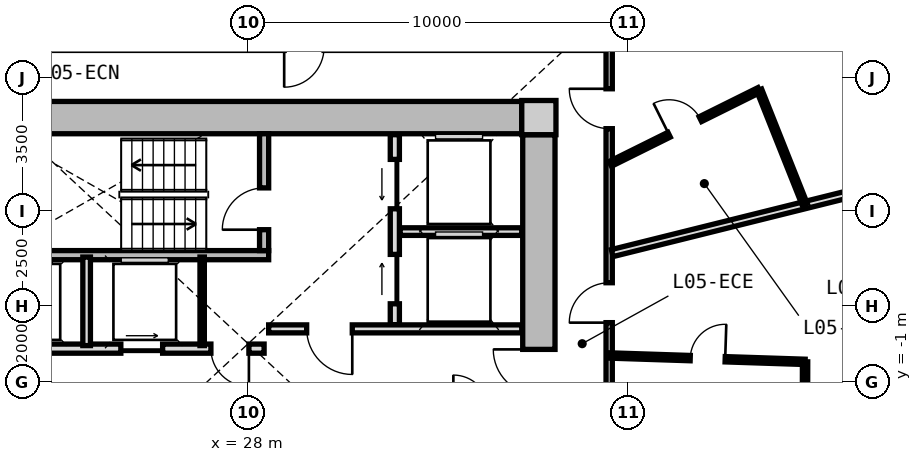
"""IFC4 building model, lengths in metres.
Left out: names, types, materials, properties, quantities, classifications, styles, units other than length and angle.
Written with IfcOpenShell. Run it as: python <this file> out.ifc"""

import sys

from ifc_helpers import new_model, si_unit, direction, frame, frame_2d, origin, origin_2d, place, context, subcontext, project, spatial, rectangle, extrude, source, transform, mapped, element, fill, save


model = new_model("IFC4")
c1 = context("Model", 3, precision=1e-05, world=origin(), true_north=direction((0.0, 1.0)))
c2 = subcontext(c1, "Body", "Model", "MODEL_VIEW")
j1 = project(units=[si_unit("LENGTHUNIT", "METRE"), si_unit("PLANEANGLEUNIT", "RADIAN")], contexts=[c1])
p1 = place(None, origin())
s1 = spatial("IfcSite", under=j1, at=p1, CompositionType="ELEMENT")
p2 = place(p1, origin())
s2 = spatial("IfcBuilding", under=s1, at=p2, CompositionType="ELEMENT")
p3 = place(p2, frame((0.0, 0.0, 21.6)))
s3 = spatial("IfcBuildingStorey", under=s2, at=p3, CompositionType="ELEMENT", Elevation=21.6)
m1 = source(origin(), c2, "Body", "SweptSolid", [
    extrude(rectangle(XDim=0.9, YDim=0.9, at=origin_2d()), origin(), (0.0, 0.0, 1.0), 3.05),
])
p4 = place(p3, frame((35.65, 5.95, 0.0), z_axis=(0.0, 0.0, 1.0), x_axis=(1.0, 0.0, 0.0)))
e1 = element("IfcColumn", 1, at=p4, inside=s3, PredefinedType="COLUMN", context=c2, shape_type="MappedRepresentation", body=[
    mapped(m1, transform((0.0, 0.0, 0.0), x_axis=(1.0, 0.0, 0.0), y_axis=(0.0, 1.0, 0.0), z_axis=(0.0, 0.0, 1.0), scale=1.0)),
])
m2 = source(origin(), c2, "Body", "SweptSolid", [
    extrude(rectangle(XDim=14.4, YDim=0.85, at=frame_2d((7.2, 0.0))), origin(), (0.0, 0.0, 1.0), 2.79),
])
p5 = place(p3, frame((20.8, 5.95, 0.0), z_axis=(0.0, 0.0, 1.0), x_axis=(1.0, 0.0, 0.0)))
e2 = element("IfcWall", 2, at=p5, inside=s3, PredefinedType="SHEAR", context=c2, shape_type="MappedRepresentation", body=[
    mapped(m2, transform((0.0, 0.0, 0.0), x_axis=(1.0, 0.0, 0.0), y_axis=(0.0, 1.0, 0.0), z_axis=(0.0, 0.0, 1.0), scale=1.0)),
])
m3 = source(origin(), c2, "Body", "SweptSolid", [
    extrude(rectangle(XDim=11.0, YDim=0.85, at=frame_2d((5.5, 0.0))), origin(), (0.0, 0.0, 1.0), 2.79),
])
p6 = place(p3, frame((35.65, 5.5, 0.0), z_axis=(0.0, 0.0, 1.0), x_axis=(0.0, -1.0, 0.0)))
e3 = element("IfcWall", 3, at=p6, inside=s3, PredefinedType="SHEAR", context=c2, shape_type="MappedRepresentation", body=[
    mapped(m3, transform((0.0, 0.0, 0.0), x_axis=(1.0, 0.0, 0.0), y_axis=(0.0, 1.0, 0.0), z_axis=(0.0, 0.0, 1.0), scale=1.0)),
])
p7 = place(p6, frame((5.65, 0.0, 0.0)))
e4 = element("IfcOpeningElement", 4, at=p7, cuts=e3, PredefinedType="OPENING", context=c2, shape_type="SweptSolid", body=[
    extrude(rectangle(XDim=1.2, YDim=2.15, at=frame_2d((0.6, 1.075))), frame((0.0, 0.435, 0.0), z_axis=(0.0, -1.0, 0.0), x_axis=(1.0, 0.0, 0.0)), (0.0, 0.0, 1.0), 0.87),
])
p8 = place(p6, frame((9.3, 0.0, 0.0)))
e5 = element("IfcOpeningElement", 5, at=p8, cuts=e3, PredefinedType="OPENING", context=c2, shape_type="SweptSolid", body=[
    extrude(rectangle(XDim=1.0, YDim=2.1, at=frame_2d((0.5, 1.05))), frame((0.0, 0.435, 0.0), z_axis=(0.0, -1.0, 0.0), x_axis=(1.0, 0.0, 0.0)), (0.0, 0.0, 1.0), 0.87),
])
m4 = source(origin(), c2, "Body", "SweptSolid", [
    extrude(rectangle(XDim=9.649, YDim=0.29, at=frame_2d((4.824, 0.0))), origin(), (0.0, 0.0, 1.0), 2.79),
])
p9 = place(p3, frame((41.916, 12.926, 0.0), z_axis=(0.0, 0.0, 1.0), x_axis=(0.527909458386, -0.849300655684, 0.0)))
e6 = element("IfcWall", 6, at=p9, inside=s3, PredefinedType="SOLIDWALL", context=c2, shape_type="MappedRepresentation", body=[
    mapped(m4, transform((0.0, 0.0, 0.0), x_axis=(1.0, 0.0, 0.0), y_axis=(0.0, 1.0, 0.0), z_axis=(0.0, 0.0, 1.0), scale=1.0)),
])
p10 = place(p9, frame((0.98, 0.0, 0.0)))
e7 = element("IfcOpeningElement", 7, at=p10, cuts=e6, PredefinedType="OPENING", context=c2, shape_type="SweptSolid", body=[
    extrude(rectangle(XDim=1.15, YDim=2.25, at=frame_2d((0.575, 1.125))), frame((0.0, 0.155, 0.0), z_axis=(0.0, -1.0, 0.0), x_axis=(1.0, 0.0, 0.0)), (0.0, 0.0, 1.0), 0.31),
])
p11 = place(p9, frame((5.174, 0.0, 0.85)))
e8 = element("IfcOpeningElement", 8, at=p11, cuts=e6, PredefinedType="OPENING", context=c2, shape_type="SweptSolid", body=[
    extrude(rectangle(XDim=1.2, YDim=1.5, at=frame_2d((0.6, 0.75))), frame((0.0, 0.155, 0.0), z_axis=(0.0, -1.0, 0.0), x_axis=(1.0, 0.0, 0.0)), (0.0, 0.0, 1.0), 0.31),
])
m5 = source(origin(), c2, "Body", "SweptSolid", [
    extrude(rectangle(XDim=7.765, YDim=0.24, at=frame_2d((3.883, 0.0))), origin(), (0.0, 0.0, 1.0), 2.79),
])
p12 = place(p3, frame((20.775, 2.33, 0.0), z_axis=(0.0, 0.0, 1.0), x_axis=(1.0, 0.0, 0.0)))
e9 = element("IfcWall", 9, at=p12, inside=s3, PredefinedType="PARTITIONING", context=c2, shape_type="MappedRepresentation", body=[
    mapped(m5, transform((0.0, 0.0, 0.0), x_axis=(1.0, 0.0, 0.0), y_axis=(0.0, 1.0, 0.0), z_axis=(0.0, 0.0, 1.0), scale=1.0)),
])
m6 = source(origin(), c2, "Body", "SweptSolid", [
    extrude(rectangle(XDim=3.075, YDim=0.24, at=frame_2d((1.538, 0.0))), origin(), (0.0, 0.0, 1.0), 2.79),
])
p13 = place(p3, frame((28.42, 2.45, 0.0), z_axis=(0.0, 0.0, 1.0), x_axis=(0.0, 1.0, 0.0)))
e10 = element("IfcWall", 10, at=p13, inside=s3, PredefinedType="PARTITIONING", context=c2, shape_type="MappedRepresentation", body=[
    mapped(m6, transform((0.0, 0.0, 0.0), x_axis=(1.0, 0.0, 0.0), y_axis=(0.0, 1.0, 0.0), z_axis=(0.0, 0.0, 1.0), scale=1.0)),
])
p14 = place(p13, frame((0.55, 0.0, 0.0)))
e11 = element("IfcOpeningElement", 11, at=p14, cuts=e10, PredefinedType="OPENING", context=c2, shape_type="SweptSolid", body=[
    extrude(rectangle(XDim=1.1, YDim=2.15, at=frame_2d((0.55, 1.075))), frame((0.0, 0.13, 0.0), z_axis=(0.0, -1.0, 0.0), x_axis=(1.0, 0.0, 0.0)), (0.0, 0.0, 1.0), 0.26),
])
m7 = source(origin(), c2, "Body", "SweptSolid", [
    extrude(rectangle(XDim=5.0, YDim=0.24, at=frame_2d((2.5, 0.0))), origin(), (0.0, 0.0, 1.0), 2.775),
])
p15 = place(p3, frame((31.86, 0.5, 0.0), z_axis=(0.0, 0.0, 1.0), x_axis=(0.0, 1.0, 0.0)))
e12 = element("IfcWall", 12, at=p15, inside=s3, PredefinedType="PARTITIONING", context=c2, shape_type="MappedRepresentation", body=[
    mapped(m7, transform((0.0, 0.0, 0.0), x_axis=(1.0, 0.0, 0.0), y_axis=(0.0, 1.0, 0.0), z_axis=(0.0, 0.0, 1.0), scale=1.0)),
])
p16 = place(p15, frame((3.05, 0.0, 0.0)))
e13 = element("IfcOpeningElement", 13, at=p16, cuts=e12, PredefinedType="OPENING", context=c2, shape_type="SweptSolid", body=[
    extrude(rectangle(XDim=1.3, YDim=2.2, at=frame_2d((0.65, 1.1))), frame((0.0, 0.13, 0.0), z_axis=(0.0, -1.0, 0.0), x_axis=(1.0, 0.0, 0.0)), (0.0, 0.0, 1.0), 0.26),
])
p17 = place(p15, frame((0.55, 0.0, 0.0)))
e14 = element("IfcOpeningElement", 14, at=p17, cuts=e12, PredefinedType="OPENING", context=c2, shape_type="SweptSolid", body=[
    extrude(rectangle(XDim=1.3, YDim=2.2, at=frame_2d((0.65, 1.1))), frame((0.0, 0.13, 0.0), z_axis=(0.0, -1.0, 0.0), x_axis=(1.0, 0.0, 0.0)), (0.0, 0.0, 1.0), 0.26),
])
m8 = source(origin(), c2, "Body", "SweptSolid", [
    extrude(rectangle(XDim=3.2, YDim=0.2, at=frame_2d((1.6, 0.0))), origin(), (0.0, 0.0, 1.0), 2.775),
])
p18 = place(p3, frame((32.0, 2.95, 0.0), z_axis=(0.0, 0.0, 1.0), x_axis=(1.0, 0.0, 0.0)))
e15 = element("IfcWall", 15, at=p18, inside=s3, PredefinedType="PARTITIONING", context=c2, shape_type="MappedRepresentation", body=[
    mapped(m8, transform((0.0, 0.0, 0.0), x_axis=(1.0, 0.0, 0.0), y_axis=(0.0, 1.0, 0.0), z_axis=(0.0, 0.0, 1.0), scale=1.0)),
])
m9 = source(origin(), c2, "Body", "SweptSolid", [
    extrude(rectangle(XDim=6.66, YDim=0.21, at=frame_2d((3.33, 0.0))), origin(), (0.0, 0.0, 1.0), 2.775),
])
p19 = place(p3, frame((28.54, 0.39, 0.0), z_axis=(0.0, 0.0, 1.0), x_axis=(1.0, 0.0, 0.0)))
e16 = element("IfcWall", 16, at=p19, inside=s3, PredefinedType="PARTITIONING", context=c2, shape_type="MappedRepresentation", body=[
    mapped(m9, transform((0.0, 0.0, 0.0), x_axis=(1.0, 0.0, 0.0), y_axis=(0.0, 1.0, 0.0), z_axis=(0.0, 0.0, 1.0), scale=1.0)),
])
p20 = place(p19, frame((1.0, 0.0, 0.0)))
e17 = element("IfcOpeningElement", 17, at=p20, cuts=e16, PredefinedType="OPENING", context=c2, shape_type="SweptSolid", body=[
    extrude(rectangle(XDim=1.2, YDim=2.15, at=frame_2d((0.6, 1.075))), frame((0.0, 0.115, 0.0), z_axis=(0.0, -1.0, 0.0), x_axis=(1.0, 0.0, 0.0)), (0.0, 0.0, 1.0), 0.23),
])
m10 = source(origin(), c2, "Body", "SweptSolid", [
    extrude(rectangle(XDim=7.62, YDim=0.24, at=frame_2d((3.81, 0.0))), origin(), (0.0, 0.0, 1.0), 2.775),
])
p21 = place(p3, frame((20.8, -0.13, 0.0), z_axis=(0.0, 0.0, 1.0), x_axis=(1.0, 0.0, 0.0)))
e18 = element("IfcWall", 18, at=p21, inside=s3, PredefinedType="PARTITIONING", context=c2, shape_type="MappedRepresentation", body=[
    mapped(m10, transform((0.0, 0.0, 0.0), x_axis=(1.0, 0.0, 0.0), y_axis=(0.0, 1.0, 0.0), z_axis=(0.0, 0.0, 1.0), scale=1.0)),
])
p22 = place(p21, frame((6.22, 0.0, 0.0)))
e19 = element("IfcOpeningElement", 19, at=p22, cuts=e18, PredefinedType="OPENING", context=c2, shape_type="SweptSolid", body=[
    extrude(rectangle(XDim=1.0, YDim=2.1, at=frame_2d((0.5, 1.05))), frame((0.0, 0.13, 0.0), z_axis=(0.0, -1.0, 0.0), x_axis=(1.0, 0.0, 0.0)), (0.0, 0.0, 1.0), 0.26),
])
p23 = place(p21, frame((0.85, 0.0, 0.0)))
e20 = element("IfcOpeningElement", 20, at=p23, cuts=e18, PredefinedType="OPENING", context=c2, shape_type="SweptSolid", body=[
    extrude(rectangle(XDim=1.1, YDim=2.2, at=frame_2d((0.55, 1.1))), frame((0.0, 0.13, 0.0), z_axis=(0.0, -1.0, 0.0), x_axis=(1.0, 0.0, 0.0)), (0.0, 0.0, 1.0), 0.26),
])
p24 = place(p21, frame((3.85, 0.0, 0.0)))
e21 = element("IfcOpeningElement", 21, at=p24, cuts=e18, PredefinedType="OPENING", context=c2, shape_type="SweptSolid", body=[
    extrude(rectangle(XDim=1.1, YDim=2.2, at=frame_2d((0.55, 1.1))), frame((0.0, 0.13, 0.0), z_axis=(0.0, -1.0, 0.0), x_axis=(1.0, 0.0, 0.0)), (0.0, 0.0, 1.0), 0.26),
])
m11 = source(origin(), c2, "Body", "SweptSolid", [
    extrude(rectangle(XDim=2.33, YDim=0.115, at=frame_2d((1.165, 0.0))), origin(), (0.0, 0.0, 1.0), 2.775),
])
p25 = place(p3, frame((26.79, -0.05, 0.0), z_axis=(0.0, 0.0, 1.0), x_axis=(0.0, 1.0, 0.0)))
e22 = element("IfcWall", 22, at=p25, inside=s3, PredefinedType="PARTITIONING", context=c2, shape_type="MappedRepresentation", body=[
    mapped(m11, transform((0.0, 0.0, 0.0), x_axis=(1.0, 0.0, 0.0), y_axis=(0.0, 1.0, 0.0), z_axis=(0.0, 0.0, 1.0), scale=1.0)),
])
m12 = source(origin(), c2, "Body", "SweptSolid", [
    extrude(rectangle(XDim=2.33, YDim=0.2, at=frame_2d((1.165, 0.0))), origin(), (0.0, 0.0, 1.0), 2.775),
])
p26 = place(p3, frame((23.75, -0.05, 0.0), z_axis=(0.0, 0.0, 1.0), x_axis=(0.0, 1.0, 0.0)))
e23 = element("IfcWall", 23, at=p26, inside=s3, PredefinedType="PARTITIONING", context=c2, shape_type="MappedRepresentation", body=[
    mapped(m12, transform((0.0, 0.0, 0.0), x_axis=(1.0, 0.0, 0.0), y_axis=(0.0, 1.0, 0.0), z_axis=(0.0, 0.0, 1.0), scale=1.0)),
])
m13 = source(origin(), c2, "Body", "SweptSolid", [
    extrude(rectangle(XDim=15.6, YDim=0.165, at=frame_2d((7.8, 0.0))), origin(), (0.0, 0.0, 1.0), 2.775),
])
p27 = place(p3, frame((37.5, 7.8, 0.0), z_axis=(0.0, 0.0, 1.0), x_axis=(0.0, -1.0, 0.0)))
e24 = element("IfcWall", 24, at=p27, inside=s3, PredefinedType="PARTITIONING", context=c2, shape_type="MappedRepresentation", body=[
    mapped(m13, transform((0.0, 0.0, 0.0), x_axis=(1.0, 0.0, 0.0), y_axis=(0.0, 1.0, 0.0), z_axis=(0.0, 0.0, 1.0), scale=1.0)),
])
p28 = place(p27, frame((12.141, 0.0, 0.0)))
e25 = element("IfcOpeningElement", 25, at=p28, cuts=e24, PredefinedType="OPENING", context=c2, shape_type="SweptSolid", body=[
    extrude(rectangle(XDim=1.25, YDim=2.2, at=frame_2d((0.625, 1.1))), frame((0.0, 0.093, 0.0), z_axis=(0.0, -1.0, 0.0), x_axis=(1.0, 0.0, 0.0)), (0.0, 0.0, 1.0), 0.185),
])
p29 = place(p27, frame((6.196, 0.0, 0.0)))
e26 = element("IfcOpeningElement", 26, at=p29, cuts=e24, PredefinedType="OPENING", context=c2, shape_type="SweptSolid", body=[
    extrude(rectangle(XDim=1.05, YDim=2.15, at=frame_2d((0.525, 1.075))), frame((0.0, 0.093, 0.0), z_axis=(0.0, -1.0, 0.0), x_axis=(1.0, 0.0, 0.0)), (0.0, 0.0, 1.0), 0.185),
])
p30 = place(p27, frame((1.092, 0.0, 0.0)))
e27 = element("IfcOpeningElement", 27, at=p30, cuts=e24, PredefinedType="OPENING", context=c2, shape_type="SweptSolid", body=[
    extrude(rectangle(XDim=1.05, YDim=2.15, at=frame_2d((0.525, 1.075))), frame((0.0, 0.093, 0.0), z_axis=(0.0, -1.0, 0.0), x_axis=(1.0, 0.0, 0.0)), (0.0, 0.0, 1.0), 0.185),
])
m14 = source(origin(), c2, "Body", "SweptSolid", [
    extrude(rectangle(XDim=9.737, YDim=0.19, at=frame_2d((4.869, 0.0))), origin(), (0.0, 0.0, 1.0), 2.225),
])
p31 = place(p3, frame((37.58, 2.385, 0.0), z_axis=(0.0, 0.0, 1.0), x_axis=(0.970392716238, 0.241532557375, 0.0)))
e28 = element("IfcWall", 28, at=p31, inside=s3, PredefinedType="PARTITIONING", context=c2, shape_type="MappedRepresentation", body=[
    mapped(m14, transform((0.0, 0.0, 0.0), x_axis=(1.0, 0.0, 0.0), y_axis=(0.0, 1.0, 0.0), z_axis=(0.0, 0.0, 1.0), scale=1.0)),
])
m15 = source(origin(), c2, "Body", "SweptSolid", [
    extrude(rectangle(XDim=5.128, YDim=0.14, at=frame_2d((2.564, 0.0))), origin(), (0.0, 0.0, 1.0), 2.775),
])
p32 = place(p3, frame((37.53, -0.311, 0.0), z_axis=(0.0, 0.0, 1.0), x_axis=(0.999469568972, -0.032566557983, 0.0)))
e29 = element("IfcWall", 29, at=p32, inside=s3, PredefinedType="PARTITIONING", context=c2, shape_type="MappedRepresentation", body=[
    mapped(m15, transform((0.0, 0.0, 0.0), x_axis=(1.0, 0.0, 0.0), y_axis=(0.0, 1.0, 0.0), z_axis=(0.0, 0.0, 1.0), scale=1.0)),
])
p33 = place(p32, frame((2.104, 0.0, 0.0)))
e30 = element("IfcOpeningElement", 30, at=p33, cuts=e29, PredefinedType="OPENING", context=c2, shape_type="SweptSolid", body=[
    extrude(rectangle(XDim=0.92, YDim=2.1, at=frame_2d((0.46, 1.05))), frame((0.0, 0.08, 0.0), z_axis=(0.0, -1.0, 0.0), x_axis=(1.0, 0.0, 0.0)), (0.0, 0.0, 1.0), 0.16),
])
m16 = source(origin(), c2, "Body", "SweptSolid", [
    extrude(rectangle(XDim=3.187, YDim=0.14, at=frame_2d((1.594, 0.0))), origin(), (0.0, 0.0, 1.0), 2.775),
])
p34 = place(p3, frame((42.655, -0.478, 0.0), z_axis=(0.0, 0.0, 1.0), x_axis=(-0.002221365642, -0.999997532764, 0.0)))
e31 = element("IfcWall", 31, at=p34, inside=s3, PredefinedType="PARTITIONING", context=c2, shape_type="MappedRepresentation", body=[
    mapped(m16, transform((0.0, 0.0, 0.0), x_axis=(1.0, 0.0, 0.0), y_axis=(0.0, 1.0, 0.0), z_axis=(0.0, 0.0, 1.0), scale=1.0)),
])
m17 = source(origin(), c2, "Body", "SweptSolid", [
    extrude(rectangle(XDim=4.374, YDim=0.14, at=frame_2d((2.187, 0.0))), origin(), (0.0, 0.0, 1.0), 2.775),
])
p35 = place(p3, frame((37.53, 4.732, 0.0), z_axis=(0.0, 0.0, 1.0), x_axis=(0.89568523908, 0.444688601714, 0.0)))
e32 = element("IfcWall", 32, at=p35, inside=s3, PredefinedType="PARTITIONING", context=c2, shape_type="MappedRepresentation", body=[
    mapped(m17, transform((0.0, 0.0, 0.0), x_axis=(1.0, 0.0, 0.0), y_axis=(0.0, 1.0, 0.0), z_axis=(0.0, 0.0, 1.0), scale=1.0)),
])
p36 = place(p35, frame((1.727, 0.0, 0.0)))
e33 = element("IfcOpeningElement", 33, at=p36, cuts=e32, PredefinedType="OPENING", context=c2, shape_type="SweptSolid", body=[
    extrude(rectangle(XDim=0.92, YDim=2.1, at=frame_2d((0.46, 1.05))), frame((0.0, 0.08, 0.0), z_axis=(0.0, -1.0, 0.0), x_axis=(1.0, 0.0, 0.0)), (0.0, 0.0, 1.0), 0.16),
])
m18 = source(origin(), c2, "Body", "SweptSolid", [
    extrude(rectangle(XDim=3.242, YDim=0.14, at=frame_2d((1.621, 0.0))), origin(), (0.0, 0.0, 1.0), 2.775),
])
p37 = place(p3, frame((41.447, 6.677, 0.0), z_axis=(0.0, 0.0, 1.0), x_axis=(0.36984501862, -0.929093462576, 0.0)))
e34 = element("IfcWall", 34, at=p37, inside=s3, PredefinedType="PARTITIONING", context=c2, shape_type="MappedRepresentation", body=[
    mapped(m18, transform((0.0, 0.0, 0.0), x_axis=(1.0, 0.0, 0.0), y_axis=(0.0, 1.0, 0.0), z_axis=(0.0, 0.0, 1.0), scale=1.0)),
])
m19 = source(origin(), c2, "Body", "SweptSolid", [
    extrude(rectangle(XDim=1.1, YDim=2.15, at=frame_2d((0.55, 1.075))), frame((0.0, 0.025, 0.0), z_axis=(0.0, -1.0, 0.0), x_axis=(1.0, 0.0, 0.0)), (0.0, 0.0, 1.0), 0.05),
])
p38 = place(p14, origin())
e35 = element("IfcDoor", 35, at=p38, inside=s3, OperationType="SINGLE_SWING_LEFT", PredefinedType="DOOR", context=c2, shape_type="MappedRepresentation", body=[
    mapped(m19, transform((0.0, 0.0, 0.0), x_axis=(1.0, 0.0, 0.0), y_axis=(0.0, 1.0, 0.0), z_axis=(0.0, 0.0, 1.0), scale=1.0)),
])
fill(e11, e35)
m20 = source(origin(), c2, "Body", "SweptSolid", [
    extrude(rectangle(XDim=1.3, YDim=2.2, at=frame_2d((0.65, 1.1))), frame((0.0, 0.025, 0.0), z_axis=(0.0, -1.0, 0.0), x_axis=(1.0, 0.0, 0.0)), (0.0, 0.0, 1.0), 0.05),
])
p39 = place(p16, origin())
e36 = element("IfcDoor", 36, at=p39, inside=s3, OperationType="SLIDING_TO_LEFT", PredefinedType="DOOR", context=c2, shape_type="MappedRepresentation", body=[
    mapped(m20, transform((0.0, 0.0, 0.0), x_axis=(1.0, 0.0, 0.0), y_axis=(0.0, 1.0, 0.0), z_axis=(0.0, 0.0, 1.0), scale=1.0)),
])
fill(e13, e36)
p40 = place(p17, origin())
e37 = element("IfcDoor", 37, at=p40, inside=s3, OperationType="SLIDING_TO_RIGHT", PredefinedType="DOOR", context=c2, shape_type="MappedRepresentation", body=[
    mapped(m20, transform((0.0, 0.0, 0.0), x_axis=(1.0, 0.0, 0.0), y_axis=(0.0, 1.0, 0.0), z_axis=(0.0, 0.0, 1.0), scale=1.0)),
])
fill(e14, e37)
m21 = source(origin(), c2, "Body", "SweptSolid", [
    extrude(rectangle(XDim=1.2, YDim=2.15, at=frame_2d((0.6, 1.075))), frame((0.0, 0.025, 0.0), z_axis=(0.0, -1.0, 0.0), x_axis=(1.0, 0.0, 0.0)), (0.0, 0.0, 1.0), 0.05),
])
p41 = place(p20, frame((1.2, 0.0, 0.0), z_axis=(0.0, 0.0, 1.0), x_axis=(-1.0, 0.0, 0.0)))
e38 = element("IfcDoor", 38, at=p41, inside=s3, OperationType="SINGLE_SWING_LEFT", PredefinedType="DOOR", context=c2, shape_type="MappedRepresentation", body=[
    mapped(m21, transform((0.0, 0.0, 0.0), x_axis=(1.0, 0.0, 0.0), y_axis=(0.0, 1.0, 0.0), z_axis=(0.0, 0.0, 1.0), scale=1.0)),
])
fill(e17, e38)
p42 = place(p7, frame((1.2, 0.0, 0.0), z_axis=(0.0, 0.0, 1.0), x_axis=(-1.0, 0.0, 0.0)))
e39 = element("IfcDoor", 39, at=p42, inside=s3, OperationType="SINGLE_SWING_RIGHT", PredefinedType="DOOR", context=c2, shape_type="MappedRepresentation", body=[
    mapped(m21, transform((0.0, 0.0, 0.0), x_axis=(1.0, 0.0, 0.0), y_axis=(0.0, 1.0, 0.0), z_axis=(0.0, 0.0, 1.0), scale=1.0)),
])
fill(e4, e39)
m22 = source(origin(), c2, "Body", "SweptSolid", [
    extrude(rectangle(XDim=1.0, YDim=2.1, at=frame_2d((0.5, 1.05))), frame((0.0, 0.025, 0.0), z_axis=(0.0, -1.0, 0.0), x_axis=(1.0, 0.0, 0.0)), (0.0, 0.0, 1.0), 0.05),
])
p43 = place(p22, frame((1.0, 0.0, 0.0), z_axis=(0.0, 0.0, 1.0), x_axis=(-1.0, 0.0, 0.0)))
e40 = element("IfcDoor", 40, at=p43, inside=s3, OperationType="SINGLE_SWING_LEFT", PredefinedType="DOOR", context=c2, shape_type="MappedRepresentation", body=[
    mapped(m22, transform((0.0, 0.0, 0.0), x_axis=(1.0, 0.0, 0.0), y_axis=(0.0, 1.0, 0.0), z_axis=(0.0, 0.0, 1.0), scale=1.0)),
])
fill(e19, e40)
m23 = source(origin(), c2, "Body", "SweptSolid", [
    extrude(rectangle(XDim=1.1, YDim=2.2, at=frame_2d((0.55, 1.1))), frame((0.0, 0.025, 0.0), z_axis=(0.0, -1.0, 0.0), x_axis=(1.0, 0.0, 0.0)), (0.0, 0.0, 1.0), 0.05),
])
p44 = place(p24, origin())
e41 = element("IfcDoor", 41, at=p44, inside=s3, OperationType="SLIDING_TO_RIGHT", PredefinedType="DOOR", context=c2, shape_type="MappedRepresentation", body=[
    mapped(m23, transform((0.0, 0.0, 0.0), x_axis=(1.0, 0.0, 0.0), y_axis=(0.0, 1.0, 0.0), z_axis=(0.0, 0.0, 1.0), scale=1.0)),
])
fill(e21, e41)
m24 = source(origin(), c2, "Body", "SweptSolid", [
    extrude(rectangle(XDim=1.05, YDim=2.15, at=frame_2d((0.525, 1.075))), frame((0.0, 0.025, 0.0), z_axis=(0.0, -1.0, 0.0), x_axis=(1.0, 0.0, 0.0)), (0.0, 0.0, 1.0), 0.05),
])
p45 = place(p29, frame((1.05, 0.0, 0.0), z_axis=(0.0, 0.0, 1.0), x_axis=(-1.0, 0.0, 0.0)))
e42 = element("IfcDoor", 42, at=p45, inside=s3, OperationType="SINGLE_SWING_LEFT", PredefinedType="DOOR", context=c2, shape_type="MappedRepresentation", body=[
    mapped(m24, transform((0.0, 0.0, 0.0), x_axis=(1.0, 0.0, 0.0), y_axis=(0.0, 1.0, 0.0), z_axis=(0.0, 0.0, 1.0), scale=1.0)),
])
fill(e26, e42)
m25 = source(origin(), c2, "Body", "SweptSolid", [
    extrude(rectangle(XDim=0.92, YDim=2.1, at=frame_2d((0.46, 1.05))), frame((0.0, 0.025, 0.0), z_axis=(0.0, -1.0, 0.0), x_axis=(1.0, 0.0, 0.0)), (0.0, 0.0, 1.0), 0.05),
])
p46 = place(p33, origin())
e43 = element("IfcDoor", 43, at=p46, inside=s3, OperationType="SINGLE_SWING_RIGHT", PredefinedType="DOOR", context=c2, shape_type="MappedRepresentation", body=[
    mapped(m25, transform((0.0, 0.0, 0.0), x_axis=(1.0, 0.0, 0.0), y_axis=(0.0, 1.0, 0.0), z_axis=(0.0, 0.0, 1.0), scale=1.0)),
])
fill(e30, e43)
p47 = place(p30, frame((1.05, 0.0, 0.0), z_axis=(0.0, 0.0, 1.0), x_axis=(-1.0, 0.0, 0.0)))
e44 = element("IfcDoor", 44, at=p47, inside=s3, OperationType="SINGLE_SWING_RIGHT", PredefinedType="DOOR", context=c2, shape_type="MappedRepresentation", body=[
    mapped(m24, transform((0.0, 0.0, 0.0), x_axis=(1.0, 0.0, 0.0), y_axis=(0.0, 1.0, 0.0), z_axis=(0.0, 0.0, 1.0), scale=1.0)),
])
fill(e27, e44)
p48 = place(p36, origin())
e45 = element("IfcDoor", 45, at=p48, inside=s3, OperationType="SINGLE_SWING_LEFT", PredefinedType="DOOR", context=c2, shape_type="MappedRepresentation", body=[
    mapped(m25, transform((0.0, 0.0, 0.0), x_axis=(1.0, 0.0, 0.0), y_axis=(0.0, 1.0, 0.0), z_axis=(0.0, 0.0, 1.0), scale=1.0)),
])
fill(e33, e45)
save(model, sys.argv[1])
